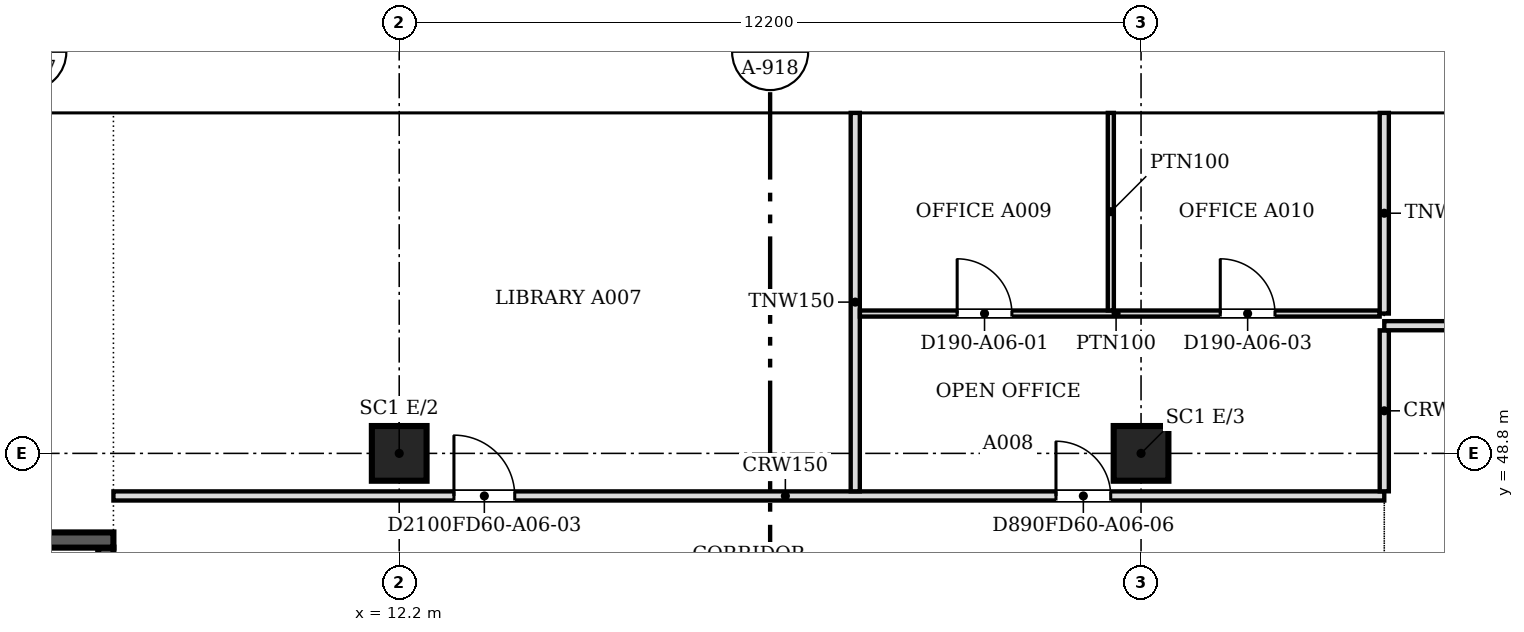
"""IFC4 building model, lengths in metres.
Left out: names, types, materials, properties, quantities, classifications, styles, units other than length and angle.
Written with IfcOpenShell. Run it as: python <this file> out.ifc"""

import sys

from ifc_helpers import new_model, si_unit, direction, frame, frame_2d, origin, origin_2d, place, context, subcontext, project, spatial, polyline, rectangle, outline, extrude, faceted_brep, source, transform, mapped, element, fill, save


model = new_model("IFC4")
c1 = context("Model", 3, precision=1e-05, world=origin(), true_north=direction((0.0, 1.0)))
c2 = subcontext(c1, "Body", "Model", "MODEL_VIEW")
j1 = project(units=[si_unit("LENGTHUNIT", "METRE"), si_unit("PLANEANGLEUNIT", "RADIAN")], contexts=[c1])
p1 = place(None, origin())
s1 = spatial("IfcSite", under=j1, at=p1, CompositionType="ELEMENT")
p2 = place(p1, origin())
s2 = spatial("IfcBuilding", under=s1, at=p2, CompositionType="ELEMENT")
p3 = place(p2, frame((0.0, 0.0, 72.4)))
s3 = spatial("IfcBuildingStorey", under=s2, at=p3, CompositionType="ELEMENT", Elevation=72.4)
for number, where, z_axis, x_axis in (
    (1, (12.2, 48.8, 0.0), (0.0, 0.0, 1.0), (1.0, 0.0, 0.0)),
    (2, (24.4, 48.8, 0.0), (0.0, 0.0, 1.0), (1.0, 0.0, 0.0)),
):
    element("IfcColumn", number, at=place(p3, frame(where, z_axis=z_axis, x_axis=x_axis)), inside=s3, PredefinedType="COLUMN", context=c2, shape_type="SweptSolid", body=[
        extrude(rectangle(XDim=0.9, YDim=0.9, at=origin_2d()), origin(), (0.0, 0.0, 1.0), 3.6),
    ])
m1 = source(origin(), c2, "Body", "SweptSolid", [
    extrude(outline(polyline([(3.05, 0.0), (6.1, 3.8), (3.05, 7.6), (0.0, 3.8), (3.05, 0.0)])), frame((0.0, 0.25, 0.0), z_axis=(0.0, -1.0, 0.0), x_axis=(1.0, 0.0, 0.0)), (0.0, 0.0, 1.0), 0.5),
])
p4 = place(p3, frame((30.5, 54.65, -3.8), z_axis=(0.0, 0.0, 1.0), x_axis=(-1.0, 0.0, 0.0)))
e3 = element("IfcWall", 3, at=p4, inside=s3, PredefinedType="SOLIDWALL", context=c2, shape_type="MappedRepresentation", body=[
    mapped(m1, transform((0.0, 0.0, 0.0), scale=1.0)),
])
m2 = source(origin(), c2, "Body", "SweptSolid", [
    extrude(outline(polyline([(3.05, 0.399), (5.78, 3.8), (3.05, 7.2), (0.321, 3.8), (3.05, 0.399)])), frame((0.0, 0.26, 0.0), z_axis=(0.0, -1.0, 0.0), x_axis=(1.0, 0.0, 0.0)), (0.0, 0.0, 1.0), 0.52),
])
p5 = place(p4, origin())
e4 = element("IfcOpeningElement", 4, at=p5, cuts=e3, PredefinedType="OPENING", context=c2, shape_type="MappedRepresentation", body=[
    mapped(m2, transform((0.0, 0.0, 0.0), scale=1.0)),
])
m3 = source(origin(), c2, "Body", "Brep", [
    faceted_brep([(3.05, -0.25, 0.0), (6.1, -0.25, 3.8), (6.1, -0.25, 3.8), (3.05, -0.25, 7.6), (0.0, -0.25, 3.8), (0.0, 0.25, 3.8), (3.05, 0.25, 7.6), (6.1, 0.25, 3.8), (6.1, 0.25, 3.8), (3.05, 0.25, 0.0)], [[[0, 1, 2, 3, 4]], [[5, 6, 7, 8, 9]], [[9, 8, 1, 0]], [[7, 6, 3, 2]], [[6, 5, 4, 3]], [[5, 9, 0, 4]], [[1, 8, 7, 2]]]),
])
p6 = place(p3, frame((24.4, 54.65, -3.8), z_axis=(0.0, 0.0, 1.0), x_axis=(-1.0, 0.0, 0.0)))
e5 = element("IfcWall", 5, at=p6, inside=s3, PredefinedType="SOLIDWALL", context=c2, shape_type="MappedRepresentation", body=[
    mapped(m3, transform((0.0, 0.0, 0.0), scale=1.0)),
])
p7 = place(p6, origin())
e6 = element("IfcOpeningElement", 6, at=p7, cuts=e5, PredefinedType="OPENING", context=c2, shape_type="MappedRepresentation", body=[
    mapped(m2, transform((0.0, 0.0, 0.0), scale=1.0)),
])
p8 = place(p3, frame((18.3, 54.65, -3.8), z_axis=(0.0, 0.0, 1.0), x_axis=(-1.0, 0.0, 0.0)))
e7 = element("IfcWall", 7, at=p8, inside=s3, PredefinedType="SOLIDWALL", context=c2, shape_type="MappedRepresentation", body=[
    mapped(m1, transform((0.0, 0.0, 0.0), scale=1.0)),
])
p9 = place(p8, origin())
e8 = element("IfcOpeningElement", 8, at=p9, cuts=e7, PredefinedType="OPENING", context=c2, shape_type="MappedRepresentation", body=[
    mapped(m2, transform((0.0, 0.0, 0.0), scale=1.0)),
])
m4 = source(origin(), c2, "Body", "Brep", [
    faceted_brep([(3.05, -0.25, 0.0), (6.053, -0.25, 3.8), (3.05, -0.25, 7.6), (0.0, -0.25, 3.8), (0.0, 0.25, 3.8), (3.05, 0.25, 7.6), (6.007, 0.25, 3.859), (6.007, 0.25, 3.741), (3.05, 0.25, 0.0), (6.053, 0.0, 3.8)], [[[0, 1, 2, 3]], [[4, 5, 6, 7, 8]], [[8, 7, 9, 1, 0]], [[6, 5, 2, 1, 9]], [[5, 4, 3, 2]], [[4, 8, 0, 3]], [[9, 7, 6]]]),
])
p10 = place(p3, frame((12.2, 54.65, -3.8), z_axis=(0.0, 0.0, 1.0), x_axis=(-1.0, 0.0, 0.0)))
e9 = element("IfcWall", 9, at=p10, inside=s3, PredefinedType="SOLIDWALL", context=c2, shape_type="MappedRepresentation", body=[
    mapped(m4, transform((0.0, 0.0, 0.0), scale=1.0)),
])
m5 = source(origin(), c2, "Body", "SweptSolid", [
    extrude(outline(polyline([(3.049, 0.401), (5.735, 3.8), (3.049, 7.199), (0.321, 3.8), (3.049, 0.401)])), frame((0.0, 0.26, 0.0), z_axis=(0.0, -1.0, 0.0), x_axis=(1.0, 0.0, 0.0)), (0.0, 0.0, 1.0), 0.52),
])
p11 = place(p10, origin())
e10 = element("IfcOpeningElement", 10, at=p11, cuts=e9, PredefinedType="OPENING", context=c2, shape_type="MappedRepresentation", body=[
    mapped(m5, transform((0.0, 0.0, 0.0), scale=1.0)),
])
p12 = place(p2, frame((0.0, 0.0, 76.2)))
s4 = spatial("IfcBuildingStorey", under=s2, at=p12, CompositionType="ELEMENT", Elevation=76.2)
m6 = source(origin(), c2, "Body", "SweptSolid", [
    extrude(outline(polyline([(3.05, 0.0), (6.1, 3.8), (3.05, 7.6), (0.0, 3.8), (3.05, 0.0)])), frame((0.0, 0.25, 0.0), z_axis=(0.0, -1.0, 0.0), x_axis=(1.0, 0.0, 0.0)), (0.0, 0.0, 1.0), 0.5),
])
p13 = place(p12, frame((33.55, 54.65, -3.8), z_axis=(0.0, 0.0, 1.0), x_axis=(-1.0, 0.0, 0.0)))
e11 = element("IfcWall", 11, at=p13, inside=s4, PredefinedType="SOLIDWALL", context=c2, shape_type="MappedRepresentation", body=[
    mapped(m6, transform((0.0, 0.0, 0.0), scale=1.0)),
])
m7 = source(origin(), c2, "Body", "SweptSolid", [
    extrude(outline(polyline([(3.05, 0.399), (5.78, 3.8), (3.05, 7.201), (0.321, 3.8), (3.05, 0.399)])), frame((0.0, 0.26, 0.0), z_axis=(0.0, -1.0, 0.0), x_axis=(1.0, 0.0, 0.0)), (0.0, 0.0, 1.0), 0.52),
])
p14 = place(p13, origin())
e12 = element("IfcOpeningElement", 12, at=p14, cuts=e11, PredefinedType="OPENING", context=c2, shape_type="MappedRepresentation", body=[
    mapped(m7, transform((0.0, 0.0, 0.0), scale=1.0)),
])
m8 = source(origin(), c2, "Body", "Brep", [
    faceted_brep([(3.05, -0.25, 0.0), (6.1, -0.25, 3.8), (6.1, -0.25, 3.8), (3.05, -0.25, 7.6), (0.0, -0.25, 3.8), (0.0, 0.25, 3.8), (3.05, 0.25, 7.6), (6.1, 0.25, 3.8), (6.1, 0.25, 3.8), (3.05, 0.25, 0.0)], [[[0, 1, 2, 3, 4]], [[5, 6, 7, 8, 9]], [[9, 8, 1, 0]], [[7, 6, 3, 2]], [[6, 5, 4, 3]], [[5, 9, 0, 4]], [[1, 8, 7, 2]]]),
])
p15 = place(p12, frame((27.45, 54.65, -3.8), z_axis=(0.0, 0.0, 1.0), x_axis=(-1.0, 0.0, 0.0)))
e13 = element("IfcWall", 13, at=p15, inside=s4, PredefinedType="SOLIDWALL", context=c2, shape_type="MappedRepresentation", body=[
    mapped(m8, transform((0.0, 0.0, 0.0), scale=1.0)),
])
p16 = place(p15, origin())
e14 = element("IfcOpeningElement", 14, at=p16, cuts=e13, PredefinedType="OPENING", context=c2, shape_type="MappedRepresentation", body=[
    mapped(m7, transform((0.0, 0.0, 0.0), scale=1.0)),
])
p17 = place(p12, frame((21.35, 54.65, -3.8), z_axis=(0.0, 0.0, 1.0), x_axis=(-1.0, 0.0, 0.0)))
e15 = element("IfcWall", 15, at=p17, inside=s4, PredefinedType="SOLIDWALL", context=c2, shape_type="MappedRepresentation", body=[
    mapped(m6, transform((0.0, 0.0, 0.0), scale=1.0)),
])
p18 = place(p17, origin())
e16 = element("IfcOpeningElement", 16, at=p18, cuts=e15, PredefinedType="OPENING", context=c2, shape_type="MappedRepresentation", body=[
    mapped(m7, transform((0.0, 0.0, 0.0), scale=1.0)),
])
p19 = place(p12, frame((15.25, 54.65, -3.8), z_axis=(0.0, 0.0, 1.0), x_axis=(-1.0, 0.0, 0.0)))
e17 = element("IfcWall", 17, at=p19, inside=s4, PredefinedType="SOLIDWALL", context=c2, shape_type="MappedRepresentation", body=[
    mapped(m6, transform((0.0, 0.0, 0.0), scale=1.0)),
])
p20 = place(p19, origin())
e18 = element("IfcOpeningElement", 18, at=p20, cuts=e17, PredefinedType="OPENING", context=c2, shape_type="MappedRepresentation", body=[
    mapped(m7, transform((0.0, 0.0, 0.0), scale=1.0)),
])
m9 = source(origin(), c2, "Body", "Brep", [
    faceted_brep([(3.003, -0.25, 0.0), (3.05, -0.25, 0.06), (3.05, -0.25, 7.54), (3.003, -0.25, 7.6), (0.0, -0.25, 3.8), (0.0, 0.25, 3.8), (2.957, 0.25, 7.541), (2.957, 0.25, 0.059), (3.003, 0.0, 0.0), (3.003, 0.0, 7.6)], [[[0, 1, 2, 3, 4]], [[5, 6, 7]], [[1, 0, 8]], [[9, 3, 2]], [[6, 5, 4, 3, 9]], [[5, 7, 8, 0, 4]], [[1, 8, 7, 6, 9, 2]]]),
])
p21 = place(p12, frame((9.15, 54.65, -3.8), z_axis=(0.0, 0.0, 1.0), x_axis=(-1.0, 0.0, 0.0)))
e19 = element("IfcWall", 19, at=p21, inside=s4, PredefinedType="SOLIDWALL", context=c2, shape_type="MappedRepresentation", body=[
    mapped(m9, transform((0.0, 0.0, 0.0), scale=1.0)),
])
m10 = source(origin(), c2, "Body", "SweptSolid", [
    extrude(outline(polyline([(2.803, 6.944), (0.319, 3.8), (2.803, 0.656), (2.803, 6.944)])), frame((0.0, 0.26, 0.0), z_axis=(0.0, -1.0, 0.0), x_axis=(1.0, 0.0, 0.0)), (0.0, 0.0, 1.0), 0.52),
])
p22 = place(p21, origin())
e20 = element("IfcOpeningElement", 20, at=p22, cuts=e19, PredefinedType="OPENING", context=c2, shape_type="MappedRepresentation", body=[
    mapped(m10, transform((0.0, 0.0, 0.0), scale=1.0)),
])
p23 = place(p3, frame((3.6, 47.375, 0.0), z_axis=(0.0, 0.0, 1.0), x_axis=(1.0, 0.0, 0.0)))
e21 = element("IfcWall", 21, at=p23, inside=s3, PredefinedType="SOLIDWALL", context=c2, shape_type="SweptSolid", body=[
    extrude(rectangle(XDim=3.9, YDim=0.25, at=frame_2d((1.95, 0.0))), origin(), (0.0, 0.0, 1.0), 3.8),
])
p24 = place(p3, frame((7.375, 47.25, 0.0), z_axis=(0.0, 0.0, 1.0), x_axis=(0.0, -1.0, 0.0)))
e22 = element("IfcWall", 22, at=p24, inside=s3, PredefinedType="SOLIDWALL", context=c2, shape_type="SweptSolid", body=[
    extrude(rectangle(XDim=8.0, YDim=0.25, at=frame_2d((4.0, 0.0))), origin(), (0.0, 0.0, 1.0), 3.8),
])
m11 = source(origin(), c2, "Body", "SweptSolid", [
    extrude(rectangle(XDim=1.2, YDim=2.1, at=frame_2d((0.6, 1.05))), frame((0.0, 0.135, 0.0), z_axis=(0.0, -1.0, 0.0), x_axis=(1.0, 0.0, 0.0)), (0.0, 0.0, 1.0), 0.27),
])
p25 = place(p24, frame((0.15, 0.0, 0.0)))
e23 = element("IfcOpeningElement", 23, at=p25, cuts=e22, PredefinedType="OPENING", context=c2, shape_type="MappedRepresentation", body=[
    mapped(m11, transform((0.0, 0.0, 0.0), scale=1.0)),
])
p26 = place(p3, frame((7.5, 48.1, 0.0), z_axis=(0.0, 0.0, 1.0), x_axis=(1.0, 0.0, 0.0)))
e24 = element("IfcWall", 24, at=p26, inside=s3, PredefinedType="PARTITIONING", context=c2, shape_type="SweptSolid", body=[
    extrude(rectangle(XDim=20.9, YDim=0.15, at=frame_2d((10.45, 0.0))), origin(), (0.0, 0.0, 1.0), 3.067),
])
m12 = source(origin(), c2, "Body", "SweptSolid", [
    extrude(rectangle(XDim=0.9, YDim=2.1, at=frame_2d((0.45, 1.05))), frame((0.0, 0.085, 0.0), z_axis=(0.0, -1.0, 0.0), x_axis=(1.0, 0.0, 0.0)), (0.0, 0.0, 1.0), 0.17),
])
p27 = place(p26, frame((15.501, 0.0, 0.0)))
e25 = element("IfcOpeningElement", 25, at=p27, cuts=e24, PredefinedType="OPENING", context=c2, shape_type="MappedRepresentation", body=[
    mapped(m12, transform((0.0, 0.0, 0.0), scale=1.0)),
])
m13 = source(origin(), c2, "Body", "SweptSolid", [
    extrude(rectangle(XDim=1.0, YDim=2.1, at=frame_2d((0.5, 1.05))), frame((0.0, 0.085, 0.0), z_axis=(0.0, -1.0, 0.0), x_axis=(1.0, 0.0, 0.0)), (0.0, 0.0, 1.0), 0.17),
])
p28 = place(p26, frame((5.6, 0.0, 0.0)))
e26 = element("IfcOpeningElement", 26, at=p28, cuts=e24, PredefinedType="OPENING", context=c2, shape_type="MappedRepresentation", body=[
    mapped(m13, transform((0.0, 0.0, 0.0), scale=1.0)),
])
p29 = place(p3, frame((19.7, 48.176, 0.0), z_axis=(0.0, 0.0, 1.0), x_axis=(0.0, 1.0, 0.0)))
e27 = element("IfcWall", 27, at=p29, inside=s3, PredefinedType="PARTITIONING", context=c2, shape_type="SweptSolid", body=[
    extrude(rectangle(XDim=6.224, YDim=0.15, at=frame_2d((3.112, 0.0))), origin(), (0.0, 0.0, 1.0), 3.067),
])
p30 = place(p3, frame((28.4, 48.176, 0.0), z_axis=(0.0, 0.0, 1.0), x_axis=(0.0, 1.0, 0.0)))
e28 = element("IfcWall", 28, at=p30, inside=s3, PredefinedType="PARTITIONING", context=c2, shape_type="SweptSolid", body=[
    extrude(rectangle(XDim=2.648, YDim=0.15, at=frame_2d((1.324, 0.0))), origin(), (0.0, 0.0, 1.0), 3.067),
])
p31 = place(p3, frame((28.4, 50.9, 0.0), z_axis=(0.0, 0.0, 1.0), x_axis=(1.0, 0.0, 0.0)))
e29 = element("IfcWall", 29, at=p31, inside=s3, PredefinedType="PARTITIONING", context=c2, shape_type="SweptSolid", body=[
    extrude(rectangle(XDim=31.254, YDim=0.15, at=frame_2d((15.627, 0.0))), origin(), (0.0, 0.0, 1.0), 3.067),
])
p32 = place(p31, frame((16.301, 0.0, 0.0)))
e30 = element("IfcOpeningElement", 30, at=p32, cuts=e29, PredefinedType="OPENING", context=c2, shape_type="MappedRepresentation", body=[
    mapped(m12, transform((0.0, 0.0, 0.0), scale=1.0)),
])
p33 = place(p31, frame((25.85, 0.0, 0.0)))
e31 = element("IfcOpeningElement", 31, at=p33, cuts=e29, PredefinedType="OPENING", context=c2, shape_type="MappedRepresentation", body=[
    mapped(m12, transform((0.0, 0.0, 0.0), scale=1.0)),
])
p34 = place(p31, frame((5.6, 0.0, 0.0)))
e32 = element("IfcOpeningElement", 32, at=p34, cuts=e29, PredefinedType="OPENING", context=c2, shape_type="MappedRepresentation", body=[
    mapped(m12, transform((0.0, 0.0, 0.0), scale=1.0)),
])
p35 = place(p3, frame((19.776, 51.1, 0.0), z_axis=(0.0, 0.0, 1.0), x_axis=(1.0, 0.0, 0.0)))
e33 = element("IfcWall", 33, at=p35, inside=s3, PredefinedType="PARTITIONING", context=c2, shape_type="SweptSolid", body=[
    extrude(rectangle(XDim=8.548, YDim=0.1, at=frame_2d((4.274, 0.0))), origin(), (0.0, 0.0, 1.0), 3.067),
])
m14 = source(origin(), c2, "Body", "SweptSolid", [
    extrude(rectangle(XDim=0.9, YDim=2.1, at=frame_2d((0.45, 1.05))), frame((0.0, 0.06, 0.0), z_axis=(0.0, -1.0, 0.0), x_axis=(1.0, 0.0, 0.0)), (0.0, 0.0, 1.0), 0.12),
])
p36 = place(p35, frame((1.6, 0.0, 0.0)))
e34 = element("IfcOpeningElement", 34, at=p36, cuts=e33, PredefinedType="OPENING", context=c2, shape_type="MappedRepresentation", body=[
    mapped(m14, transform((0.0, 0.0, 0.0), scale=1.0)),
])
p37 = place(p35, frame((5.927, 0.0, 0.0)))
e35 = element("IfcOpeningElement", 35, at=p37, cuts=e33, PredefinedType="OPENING", context=c2, shape_type="MappedRepresentation", body=[
    mapped(m14, transform((0.0, 0.0, 0.0), scale=1.0)),
])
p38 = place(p3, frame((28.4, 51.1, 0.0), z_axis=(0.0, 0.0, 1.0), x_axis=(0.0, 1.0, 0.0)))
e36 = element("IfcWall", 36, at=p38, inside=s3, PredefinedType="PARTITIONING", context=c2, shape_type="SweptSolid", body=[
    extrude(rectangle(XDim=3.3, YDim=0.15, at=frame_2d((1.65, 0.0))), origin(), (0.0, 0.0, 1.0), 3.067),
])
p39 = place(p3, frame((23.903, 51.151, 0.0), z_axis=(0.0, 0.0, 1.0), x_axis=(0.0, 1.0, 0.0)))
e37 = element("IfcWall", 37, at=p39, inside=s3, PredefinedType="PARTITIONING", context=c2, shape_type="SweptSolid", body=[
    extrude(rectangle(XDim=3.249, YDim=0.1, at=frame_2d((1.625, 0.0))), origin(), (0.0, 0.0, 1.0), 3.067),
])
m15 = source(origin(), c2, "Body", "SweptSolid", [
    extrude(rectangle(XDim=0.9, YDim=2.1, at=frame_2d((0.45, 1.05))), frame((0.0, 0.025, 0.0), z_axis=(0.0, -1.0, 0.0), x_axis=(1.0, 0.0, 0.0)), (0.0, 0.0, 1.0), 0.05),
])
p40 = place(p36, origin())
e38 = element("IfcDoor", 38, at=p40, inside=s3, OperationType="SINGLE_SWING_LEFT", PredefinedType="DOOR", context=c2, shape_type="MappedRepresentation", body=[
    mapped(m15, transform((0.0, 0.0, 0.0), scale=1.0)),
])
fill(e34, e38)
p41 = place(p37, origin())
e39 = element("IfcDoor", 39, at=p41, inside=s3, OperationType="SINGLE_SWING_LEFT", PredefinedType="DOOR", context=c2, shape_type="MappedRepresentation", body=[
    mapped(m15, transform((0.0, 0.0, 0.0), scale=1.0)),
])
fill(e35, e39)
p42 = place(p27, origin())
e40 = element("IfcDoor", 40, at=p42, inside=s3, OperationType="SINGLE_SWING_LEFT", PredefinedType="DOOR", context=c2, shape_type="MappedRepresentation", body=[
    mapped(m15, transform((0.0, 0.0, 0.0), scale=1.0)),
])
fill(e25, e40)
m16 = source(origin(), c2, "Body", "SweptSolid", [
    extrude(rectangle(XDim=1.0, YDim=2.1, at=frame_2d((0.5, 1.05))), frame((0.0, 0.025, 0.0), z_axis=(0.0, -1.0, 0.0), x_axis=(1.0, 0.0, 0.0)), (0.0, 0.0, 1.0), 0.05),
])
p43 = place(p28, origin())
e41 = element("IfcDoor", 41, at=p43, inside=s3, OperationType="SINGLE_SWING_LEFT", PredefinedType="DOOR", context=c2, shape_type="MappedRepresentation", body=[
    mapped(m16, transform((0.0, 0.0, 0.0), scale=1.0)),
])
fill(e26, e41)
save(model, sys.argv[1])
